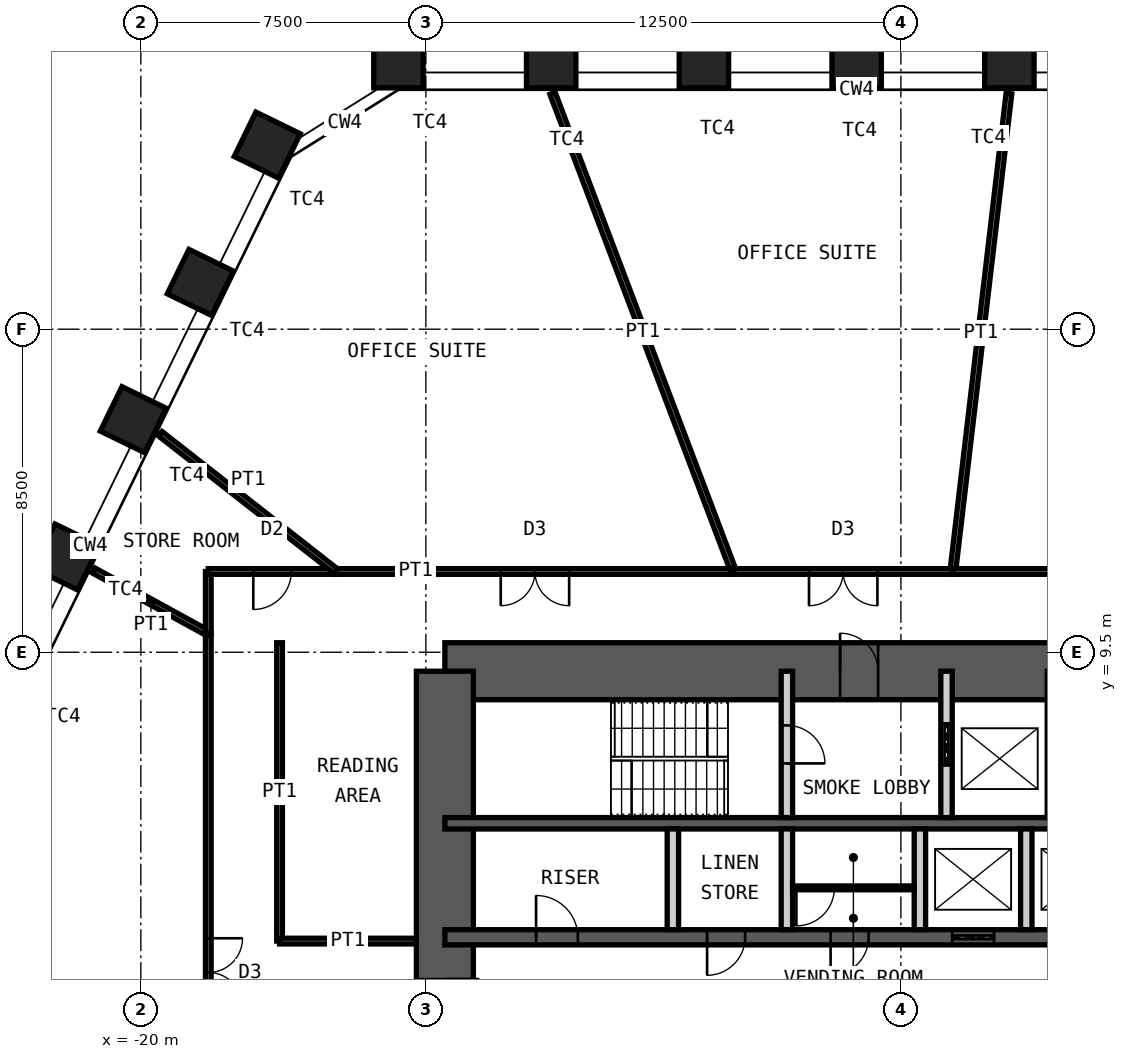
"""IFC4 building model, lengths in metres.
Left out: names, types, materials, properties, quantities, classifications, styles, units other than length and angle.
Written with IfcOpenShell. Run it as: python <this file> out.ifc"""

import sys

from ifc_helpers import new_model, si_unit, direction, frame, frame_2d, origin, origin_2d, place, context, subcontext, project, spatial, rectangle, hollow_rectangle, extrude, element, fill, save


model = new_model("IFC4")
c1 = context("Model", 3, precision=1e-05, world=origin(), true_north=direction((0.0, 1.0)))
c2 = subcontext(c1, "Body", "Model", "MODEL_VIEW")
j1 = project(units=[si_unit("LENGTHUNIT", "METRE"), si_unit("PLANEANGLEUNIT", "RADIAN")], contexts=[c1])
p1 = place(None, origin())
s1 = spatial("IfcSite", under=j1, at=p1, CompositionType="ELEMENT")
p2 = place(p1, origin())
s2 = spatial("IfcBuilding", under=s1, at=p2, CompositionType="ELEMENT")
p3 = place(p2, frame((0.0, 0.0, 166.0)))
s3 = spatial("IfcBuildingStorey", under=s2, at=p3, CompositionType="ELEMENT", Elevation=166.0)
for number, where, z_axis, x_axis in (
    (1, (-13.222, 25.0, 0.0), (0.0, 0.0, 1.0), (-1.0, 0.0, 0.0)),
    (2, (-9.203, 25.0, 0.0), (0.0, 0.0, 1.0), (-1.0, 0.0, 0.0)),
    (3, (-5.184, 25.0, 0.0), (0.0, 0.0, 1.0), (-1.0, 0.0, 0.0)),
    (4, (-1.165, 25.0, 0.0), (0.0, 0.0, 1.0), (-1.0, 0.0, 0.0)),
    (5, (2.854, 25.0, 0.0), (0.0, 0.0, 1.0), (-1.0, 0.0, 0.0)),
    (6, (-21.959, 12.006, 0.0), (0.0, 0.0, 1.0), (-0.438, -0.899, 0.0)),
    (7, (-20.198, 15.618, 0.0), (0.0, 0.0, 1.0), (-0.438, -0.899, 0.0)),
    (8, (-18.436, 19.23, 0.0), (0.0, 0.0, 1.0), (-0.438, -0.899, 0.0)),
    (9, (-16.674, 22.843, 0.0), (0.0, 0.0, 1.0), (-0.438, -0.899, 0.0)),
):
    element("IfcColumn", number, at=place(p3, frame(where, z_axis=z_axis, x_axis=x_axis)), inside=s3, PredefinedType="COLUMN", context=c2, shape_type="SweptSolid", body=[
        extrude(hollow_rectangle(XDim=1.3, YDim=1.3, WallThickness=0.1, at=origin_2d()), origin(), (0.0, 0.0, 1.0), 4.2),
    ])
p4 = place(p3, frame((-12.0, 9.0, 0.0), z_axis=(0.0, 0.0, 1.0), x_axis=(1.0, 0.0, 0.0)))
e10 = element("IfcWall", 10, at=p4, inside=s3, PredefinedType="SHEAR", context=c2, shape_type="SweptSolid", body=[
    extrude(rectangle(XDim=24.0, YDim=1.5, at=frame_2d((12.0, 0.0))), origin(), (0.0, 0.0, 1.0), 4.2),
])
p5 = place(p4, frame((10.4, 0.0, 0.0)))
e11 = element("IfcOpeningElement", 11, at=p5, cuts=e10, PredefinedType="OPENING", context=c2, shape_type="SweptSolid", body=[
    extrude(rectangle(XDim=1.0, YDim=2.1, at=frame_2d((0.5, 1.05))), frame((0.0, 0.76, 0.0), z_axis=(0.0, -1.0, 0.0), x_axis=(1.0, 0.0, 0.0)), (0.0, 0.0, 1.0), 1.52),
])
p6 = place(p4, frame((17.6, 0.0, 0.0)))
e12 = element("IfcOpeningElement", 12, at=p6, cuts=e10, PredefinedType="OPENING", context=c2, shape_type="SweptSolid", body=[
    extrude(rectangle(XDim=0.9, YDim=2.1, at=frame_2d((0.45, 1.05))), frame((0.0, 0.76, 0.0), z_axis=(0.0, -1.0, 0.0), x_axis=(1.0, 0.0, 0.0)), (0.0, 0.0, 1.0), 1.52),
])
p7 = place(p4, frame((21.9, 0.0, 0.0)))
e13 = element("IfcOpeningElement", 13, at=p7, cuts=e10, PredefinedType="OPENING", context=c2, shape_type="SweptSolid", body=[
    extrude(rectangle(XDim=0.9, YDim=2.1, at=frame_2d((0.45, 1.05))), frame((0.0, 0.76, 0.0), z_axis=(0.0, -1.0, 0.0), x_axis=(1.0, 0.0, 0.0)), (0.0, 0.0, 1.0), 1.52),
])
p8 = place(p3, frame((-12.0, -9.0, 0.0), z_axis=(0.0, 0.0, 1.0), x_axis=(0.0, 1.0, 0.0)))
e14 = element("IfcWall", 14, at=p8, inside=s3, PredefinedType="SHEAR", context=c2, shape_type="SweptSolid", body=[
    extrude(rectangle(XDim=18.0, YDim=1.5, at=frame_2d((9.0, 0.0))), origin(), (0.0, 0.0, 1.0), 4.2),
])
p9 = place(p8, frame((8.1, 0.0, 0.0)))
e15 = element("IfcOpeningElement", 15, at=p9, cuts=e14, PredefinedType="OPENING", context=c2, shape_type="SweptSolid", body=[
    extrude(rectangle(XDim=1.8, YDim=2.1, at=frame_2d((0.9, 1.05))), frame((0.0, 0.76, 0.0), z_axis=(0.0, -1.0, 0.0), x_axis=(1.0, 0.0, 0.0)), (0.0, 0.0, 1.0), 1.52),
])
p10 = place(p3, frame((-12.0, 5.0, 0.0), z_axis=(0.0, 0.0, 1.0), x_axis=(1.0, 0.0, 0.0)))
e16 = element("IfcWall", 16, at=p10, inside=s3, PredefinedType="SHEAR", context=c2, shape_type="SweptSolid", body=[
    extrude(rectangle(XDim=24.0, YDim=0.3, at=frame_2d((12.0, 0.0))), origin(), (0.0, 0.0, 1.0), 4.2),
])
p11 = place(p3, frame((-12.0, 2.0, 0.0), z_axis=(0.0, 0.0, 1.0), x_axis=(1.0, 0.0, 0.0)))
e17 = element("IfcWall", 17, at=p11, inside=s3, PredefinedType="SHEAR", context=c2, shape_type="SweptSolid", body=[
    extrude(rectangle(XDim=24.0, YDim=0.4, at=frame_2d((12.0, 0.0))), origin(), (0.0, 0.0, 1.0), 4.2),
])
p12 = place(p11, frame((2.4, 0.0, 0.0)))
e18 = element("IfcOpeningElement", 18, at=p12, cuts=e17, PredefinedType="OPENING", context=c2, shape_type="SweptSolid", body=[
    extrude(rectangle(XDim=1.1, YDim=2.1, at=frame_2d((0.55, 1.05))), frame((0.0, 0.21, 0.0), z_axis=(0.0, -1.0, 0.0), x_axis=(1.0, 0.0, 0.0)), (0.0, 0.0, 1.0), 0.42),
])
p13 = place(p11, frame((22.0, 0.0, 0.0)))
e19 = element("IfcOpeningElement", 19, at=p13, cuts=e17, PredefinedType="OPENING", context=c2, shape_type="SweptSolid", body=[
    extrude(rectangle(XDim=1.1, YDim=2.1, at=frame_2d((0.55, 1.05))), frame((0.0, 0.21, 0.0), z_axis=(0.0, -1.0, 0.0), x_axis=(1.0, 0.0, 0.0)), (0.0, 0.0, 1.0), 0.42),
])
p14 = place(p11, frame((10.15, 0.0, 0.0)))
e20 = element("IfcOpeningElement", 20, at=p14, cuts=e17, PredefinedType="OPENING", context=c2, shape_type="SweptSolid", body=[
    extrude(rectangle(XDim=1.0, YDim=2.1, at=frame_2d((0.5, 1.05))), frame((0.0, 0.21, 0.0), z_axis=(0.0, -1.0, 0.0), x_axis=(1.0, 0.0, 0.0)), (0.0, 0.0, 1.0), 0.42),
])
p15 = place(p11, frame((6.9, 0.0, 0.0)))
e21 = element("IfcOpeningElement", 21, at=p15, cuts=e17, PredefinedType="OPENING", context=c2, shape_type="SweptSolid", body=[
    extrude(rectangle(XDim=1.0, YDim=2.1, at=frame_2d((0.5, 1.05))), frame((0.0, 0.21, 0.0), z_axis=(0.0, -1.0, 0.0), x_axis=(1.0, 0.0, 0.0)), (0.0, 0.0, 1.0), 0.42),
])
p16 = place(p11, frame((13.35, 0.0, 0.0)))
e22 = element("IfcOpeningElement", 22, at=p16, cuts=e17, PredefinedType="OPENING", context=c2, shape_type="SweptSolid", body=[
    extrude(rectangle(XDim=1.1, YDim=2.4, at=frame_2d((0.55, 1.2))), frame((0.0, 0.21, 0.0), z_axis=(0.0, -1.0, 0.0), x_axis=(1.0, 0.0, 0.0)), (0.0, 0.0, 1.0), 0.42),
])
p17 = place(p11, frame((16.15, 0.0, 0.0)))
e23 = element("IfcOpeningElement", 23, at=p17, cuts=e17, PredefinedType="OPENING", context=c2, shape_type="SweptSolid", body=[
    extrude(rectangle(XDim=1.1, YDim=2.4, at=frame_2d((0.55, 1.2))), frame((0.0, 0.21, 0.0), z_axis=(0.0, -1.0, 0.0), x_axis=(1.0, 0.0, 0.0)), (0.0, 0.0, 1.0), 0.42),
])
p18 = place(p11, frame((18.95, 0.0, 0.0)))
e24 = element("IfcOpeningElement", 24, at=p18, cuts=e17, PredefinedType="OPENING", context=c2, shape_type="SweptSolid", body=[
    extrude(rectangle(XDim=1.1, YDim=2.4, at=frame_2d((0.55, 1.2))), frame((0.0, 0.21, 0.0), z_axis=(0.0, -1.0, 0.0), x_axis=(1.0, 0.0, 0.0)), (0.0, 0.0, 1.0), 0.42),
])
p19 = place(p3, frame((-3.0, 5.15, 0.0), z_axis=(0.0, 0.0, 1.0), x_axis=(0.0, 1.0, 0.0)))
e25 = element("IfcWall", 25, at=p19, inside=s3, PredefinedType="PARTITIONING", context=c2, shape_type="SweptSolid", body=[
    extrude(rectangle(XDim=3.85, YDim=0.3, at=frame_2d((1.925, 0.0))), origin(), (0.0, 0.0, 1.0), 3.98),
])
p20 = place(p19, frame((1.425, 0.0, 0.0)))
e26 = element("IfcOpeningElement", 26, at=p20, cuts=e25, PredefinedType="OPENING", context=c2, shape_type="SweptSolid", body=[
    extrude(rectangle(XDim=1.0, YDim=2.1, at=frame_2d((0.5, 1.05))), frame((0.0, 0.16, 0.0), z_axis=(0.0, -1.0, 0.0), x_axis=(1.0, 0.0, 0.0)), (0.0, 0.0, 1.0), 0.32),
])
p21 = place(p3, frame((1.2, 5.15, 0.0), z_axis=(0.0, 0.0, 1.0), x_axis=(0.0, 1.0, 0.0)))
e27 = element("IfcWall", 27, at=p21, inside=s3, PredefinedType="PARTITIONING", context=c2, shape_type="SweptSolid", body=[
    extrude(rectangle(XDim=3.85, YDim=0.3, at=frame_2d((1.925, 0.0))), origin(), (0.0, 0.0, 1.0), 3.98),
])
p22 = place(p21, frame((1.375, 0.0, 0.0)))
e28 = element("IfcOpeningElement", 28, at=p22, cuts=e27, PredefinedType="OPENING", context=c2, shape_type="SweptSolid", body=[
    extrude(rectangle(XDim=1.1, YDim=2.4, at=frame_2d((0.55, 1.2))), frame((0.0, 0.16, 0.0), z_axis=(0.0, -1.0, 0.0), x_axis=(1.0, 0.0, 0.0)), (0.0, 0.0, 1.0), 0.32),
])
p23 = place(p3, frame((4.0, 5.15, 0.0), z_axis=(0.0, 0.0, 1.0), x_axis=(0.0, 1.0, 0.0)))
e29 = element("IfcWall", 29, at=p23, inside=s3, PredefinedType="PARTITIONING", context=c2, shape_type="SweptSolid", body=[
    extrude(rectangle(XDim=3.85, YDim=0.3, at=frame_2d((1.925, 0.0))), origin(), (0.0, 0.0, 1.0), 3.98),
])
for number, where, z_axis, x_axis in (
    (30, (-6.0, 2.2, 0.0), (0.0, 0.0, 1.0), (0.0, 1.0, 0.0)),
    (31, (-3.0, 2.2, 0.0), (0.0, 0.0, 1.0), (0.0, 1.0, 0.0)),
    (32, (0.5, 2.2, 0.0), (0.0, 0.0, 1.0), (0.0, 1.0, 0.0)),
    (33, (3.3, 2.2, 0.0), (0.0, 0.0, 1.0), (0.0, 1.0, 0.0)),
):
    element("IfcWall", number, at=place(p3, frame(where, z_axis=z_axis, x_axis=x_axis)), inside=s3, PredefinedType="PARTITIONING", context=c2, shape_type="SweptSolid", body=[
        extrude(rectangle(XDim=2.65, YDim=0.3, at=frame_2d((1.325, 0.0))), origin(), (0.0, 0.0, 1.0), 3.98),
    ])
p24 = place(p3, frame((-2.85, 3.3, 0.0), z_axis=(0.0, 0.0, 1.0), x_axis=(1.0, 0.0, 0.0)))
e34 = element("IfcWall", 34, at=p24, inside=s3, PredefinedType="PARTITIONING", context=c2, shape_type="SweptSolid", body=[
    extrude(rectangle(XDim=3.2, YDim=0.1, at=frame_2d((1.6, 0.0))), origin(), (0.0, 0.0, 1.0), 3.98),
])
p25 = place(p24, frame((0.1, 0.0, 0.0)))
e35 = element("IfcOpeningElement", 35, at=p25, cuts=e34, PredefinedType="OPENING", context=c2, shape_type="SweptSolid", body=[
    extrude(rectangle(XDim=1.0, YDim=2.4, at=frame_2d((0.5, 1.2))), frame((0.0, 0.06, 0.0), z_axis=(0.0, -1.0, 0.0), x_axis=(1.0, 0.0, 0.0)), (0.0, 0.0, 1.0), 0.12),
])
p26 = place(p3, frame((2.843, 24.201, 0.0), z_axis=(0.0, 0.0, 1.0), x_axis=(-0.116670084723, -0.993170726175, 0.0)))
e36 = element("IfcWall", 36, at=p26, inside=s3, PredefinedType="PARTITIONING", context=c2, shape_type="SweptSolid", body=[
    extrude(rectangle(XDim=12.662, YDim=0.15, at=frame_2d((6.331, 0.0))), origin(), (0.0, 0.0, 1.0), 2.93),
])
p27 = place(p3, frame((1.366, 11.625, 0.0), z_axis=(0.0, 0.0, 1.0), x_axis=(1.0, 0.0, 0.0)))
e37 = element("IfcWall", 37, at=p27, inside=s3, PredefinedType="PARTITIONING", context=c2, shape_type="SweptSolid", body=[
    extrude(rectangle(XDim=8.46, YDim=0.15, at=frame_2d((4.23, 0.0))), origin(), (0.0, 0.0, 1.0), 4.03),
])
p28 = place(p27, frame((3.33, 0.0, 0.0)))
e38 = element("IfcOpeningElement", 38, at=p28, cuts=e37, PredefinedType="OPENING", context=c2, shape_type="SweptSolid", body=[
    extrude(rectangle(XDim=1.8, YDim=2.4, at=frame_2d((0.9, 1.2))), frame((0.0, 0.085, 0.0), z_axis=(0.0, -1.0, 0.0), x_axis=(1.0, 0.0, 0.0)), (0.0, 0.0, 1.0), 0.17),
])
p29 = place(p3, frame((-18.225, -7.849, 0.0), z_axis=(0.0, 0.0, 1.0), x_axis=(0.0, 1.0, 0.0)))
e39 = element("IfcWall", 39, at=p29, inside=s3, PredefinedType="PARTITIONING", context=c2, shape_type="SweptSolid", body=[
    extrude(rectangle(XDim=17.845, YDim=0.15, at=frame_2d((8.922, 0.0))), origin(), (0.0, 0.0, 1.0), 4.03),
])
p30 = place(p29, frame((8.022, 0.0, 0.0)))
e40 = element("IfcOpeningElement", 40, at=p30, cuts=e39, PredefinedType="OPENING", context=c2, shape_type="SweptSolid", body=[
    extrude(rectangle(XDim=1.8, YDim=2.4, at=frame_2d((0.9, 1.2))), frame((0.0, 0.085, 0.0), z_axis=(0.0, -1.0, 0.0), x_axis=(1.0, 0.0, 0.0)), (0.0, 0.0, 1.0), 0.17),
])
p31 = place(p3, frame((-21.242, 11.651, 0.0), z_axis=(0.0, 0.0, 1.0), x_axis=(0.876768023831, -0.480913539409, 0.0)))
e41 = element("IfcWall", 41, at=p31, inside=s3, PredefinedType="PARTITIONING", context=c2, shape_type="SweptSolid", body=[
    extrude(rectangle(XDim=3.441, YDim=0.15, at=frame_2d((1.721, 0.0))), origin(), (0.0, 0.0, 1.0), 2.93),
])
p32 = place(p3, frame((-18.225, 9.996, 0.0), z_axis=(0.0, 0.0, 1.0), x_axis=(0.0, 1.0, 0.0)))
e42 = element("IfcWall", 42, at=p32, inside=s3, PredefinedType="PARTITIONING", context=c2, shape_type="SweptSolid", body=[
    extrude(rectangle(XDim=1.629, YDim=0.15, at=frame_2d((0.814, 0.0))), origin(), (0.0, 0.0, 1.0), 4.03),
])
p33 = place(p3, frame((-18.225, 11.625, 0.0), z_axis=(0.0, 0.0, 1.0), x_axis=(1.0, 0.0, 0.0)))
e43 = element("IfcWall", 43, at=p33, inside=s3, PredefinedType="PARTITIONING", context=c2, shape_type="SweptSolid", body=[
    extrude(rectangle(XDim=3.368, YDim=0.15, at=frame_2d((1.684, 0.0))), origin(), (0.0, 0.0, 1.0), 4.03),
])
p34 = place(p33, frame((1.184, 0.0, 0.0)))
e44 = element("IfcOpeningElement", 44, at=p34, cuts=e43, PredefinedType="OPENING", context=c2, shape_type="SweptSolid", body=[
    extrude(rectangle(XDim=1.0, YDim=2.4, at=frame_2d((0.5, 1.2))), frame((0.0, 0.085, 0.0), z_axis=(0.0, -1.0, 0.0), x_axis=(1.0, 0.0, 0.0)), (0.0, 0.0, 1.0), 0.17),
])
p35 = place(p3, frame((-19.49, 15.25, 0.0), z_axis=(0.0, 0.0, 1.0), x_axis=(0.787549668605, -0.616251182133, 0.0)))
e45 = element("IfcWall", 45, at=p35, inside=s3, PredefinedType="PARTITIONING", context=c2, shape_type="SweptSolid", body=[
    extrude(rectangle(XDim=5.882, YDim=0.15, at=frame_2d((2.941, 0.0))), origin(), (0.0, 0.0, 1.0), 2.93),
])
p36 = place(p3, frame((-14.857, 11.625, 0.0), z_axis=(0.0, 0.0, 1.0), x_axis=(1.0, 0.0, 0.0)))
e46 = element("IfcWall", 46, at=p36, inside=s3, PredefinedType="PARTITIONING", context=c2, shape_type="SweptSolid", body=[
    extrude(rectangle(XDim=10.455, YDim=0.15, at=frame_2d((5.227, 0.0))), origin(), (0.0, 0.0, 1.0), 4.03),
])
p37 = place(p36, frame((4.327, 0.0, 0.0)))
e47 = element("IfcOpeningElement", 47, at=p37, cuts=e46, PredefinedType="OPENING", context=c2, shape_type="SweptSolid", body=[
    extrude(rectangle(XDim=1.8, YDim=2.4, at=frame_2d((0.9, 1.2))), frame((0.0, 0.085, 0.0), z_axis=(0.0, -1.0, 0.0), x_axis=(1.0, 0.0, 0.0)), (0.0, 0.0, 1.0), 0.17),
])
p38 = place(p3, frame((-9.167, 24.207, 0.0), z_axis=(0.0, 0.0, 1.0), x_axis=(0.354156368181, -0.935186220427, 0.0)))
e48 = element("IfcWall", 48, at=p38, inside=s3, PredefinedType="PARTITIONING", context=c2, shape_type="SweptSolid", body=[
    extrude(rectangle(XDim=13.454, YDim=0.15, at=frame_2d((6.727, 0.0))), origin(), (0.0, 0.0, 1.0), 2.93),
])
p39 = place(p3, frame((-4.403, 11.625, 0.0), z_axis=(0.0, 0.0, 1.0), x_axis=(1.0, 0.0, 0.0)))
e49 = element("IfcWall", 49, at=p39, inside=s3, PredefinedType="PARTITIONING", context=c2, shape_type="SweptSolid", body=[
    extrude(rectangle(XDim=5.768, YDim=0.15, at=frame_2d((2.884, 0.0))), origin(), (0.0, 0.0, 1.0), 4.03),
])
p40 = place(p39, frame((1.984, 0.0, 0.0)))
e50 = element("IfcOpeningElement", 50, at=p40, cuts=e49, PredefinedType="OPENING", context=c2, shape_type="SweptSolid", body=[
    extrude(rectangle(XDim=1.8, YDim=2.4, at=frame_2d((0.9, 1.2))), frame((0.0, 0.085, 0.0), z_axis=(0.0, -1.0, 0.0), x_axis=(1.0, 0.0, 0.0)), (0.0, 0.0, 1.0), 0.17),
])
p41 = place(p3, frame((-16.35, 1.9, 0.0), z_axis=(0.0, 0.0, 1.0), x_axis=(0.0, 1.0, 0.0)))
e51 = element("IfcWall", 51, at=p41, inside=s3, PredefinedType="PARTITIONING", context=c2, shape_type="SweptSolid", body=[
    extrude(rectangle(XDim=7.85, YDim=0.15, at=frame_2d((3.925, 0.0))), origin(), (0.0, 0.0, 1.0), 4.03),
])
p42 = place(p3, frame((-12.75, 1.9, 0.0), z_axis=(0.0, 0.0, 1.0), x_axis=(-1.0, 0.0, 0.0)))
e52 = element("IfcWall", 52, at=p42, inside=s3, PredefinedType="PARTITIONING", context=c2, shape_type="SweptSolid", body=[
    extrude(rectangle(XDim=3.6, YDim=0.15, at=frame_2d((1.8, 0.0))), origin(), (0.0, 0.0, 1.0), 2.93),
])
p43 = place(p5, origin())
e53 = element("IfcDoor", 53, at=p43, inside=s3, OperationType="SINGLE_SWING_RIGHT", PredefinedType="DOOR", context=c2, shape_type="SweptSolid", body=[
    extrude(rectangle(XDim=1.0, YDim=2.1, at=frame_2d((0.5, 1.05))), frame((0.0, 0.025, 0.0), z_axis=(0.0, -1.0, 0.0), x_axis=(1.0, 0.0, 0.0)), (0.0, 0.0, 1.0), 0.05),
])
fill(e11, e53)
p44 = place(p20, origin())
e54 = element("IfcDoor", 54, at=p44, inside=s3, OperationType="SINGLE_SWING_LEFT", PredefinedType="DOOR", context=c2, shape_type="SweptSolid", body=[
    extrude(rectangle(XDim=1.0, YDim=2.1, at=frame_2d((0.5, 1.05))), frame((0.0, 0.025, 0.0), z_axis=(0.0, -1.0, 0.0), x_axis=(1.0, 0.0, 0.0)), (0.0, 0.0, 1.0), 0.05),
])
fill(e26, e54)
p45 = place(p12, origin())
e55 = element("IfcDoor", 55, at=p45, inside=s3, OperationType="SINGLE_SWING_RIGHT", PredefinedType="DOOR", context=c2, shape_type="SweptSolid", body=[
    extrude(rectangle(XDim=1.1, YDim=2.1, at=frame_2d((0.55, 1.05))), frame((0.0, 0.025, 0.0), z_axis=(0.0, -1.0, 0.0), x_axis=(1.0, 0.0, 0.0)), (0.0, 0.0, 1.0), 0.05),
])
fill(e18, e55)
p46 = place(p14, origin())
e56 = element("IfcDoor", 56, at=p46, inside=s3, OperationType="SINGLE_SWING_LEFT", PredefinedType="DOOR", context=c2, shape_type="SweptSolid", body=[
    extrude(rectangle(XDim=1.0, YDim=2.1, at=frame_2d((0.5, 1.05))), frame((0.0, 0.025, 0.0), z_axis=(0.0, -1.0, 0.0), x_axis=(1.0, 0.0, 0.0)), (0.0, 0.0, 1.0), 0.05),
])
fill(e20, e56)
p47 = place(p9, origin())
e57 = element("IfcDoor", 57, at=p47, inside=s3, OperationType="DOUBLE_DOOR_DOUBLE_SWING", PredefinedType="DOOR", context=c2, shape_type="SweptSolid", body=[
    extrude(rectangle(XDim=1.8, YDim=2.1, at=frame_2d((0.9, 1.05))), frame((0.0, 0.025, 0.0), z_axis=(0.0, -1.0, 0.0), x_axis=(1.0, 0.0, 0.0)), (0.0, 0.0, 1.0), 0.05),
])
fill(e15, e57)
p48 = place(p22, origin())
e58 = element("IfcDoor", 58, at=p48, inside=s3, OperationType="DOUBLE_DOOR_SLIDING", PredefinedType="DOOR", context=c2, shape_type="SweptSolid", body=[
    extrude(rectangle(XDim=1.1, YDim=2.4, at=frame_2d((0.55, 1.2))), frame((0.0, 0.025, 0.0), z_axis=(0.0, -1.0, 0.0), x_axis=(1.0, 0.0, 0.0)), (0.0, 0.0, 1.0), 0.05),
])
fill(e28, e58)
p49 = place(p15, origin())
e59 = element("IfcDoor", 59, at=p49, inside=s3, OperationType="SINGLE_SWING_LEFT", PredefinedType="DOOR", context=c2, shape_type="SweptSolid", body=[
    extrude(rectangle(XDim=1.0, YDim=2.1, at=frame_2d((0.5, 1.05))), frame((0.0, 0.025, 0.0), z_axis=(0.0, -1.0, 0.0), x_axis=(1.0, 0.0, 0.0)), (0.0, 0.0, 1.0), 0.05),
])
fill(e21, e59)
p50 = place(p16, origin())
e60 = element("IfcDoor", 60, at=p50, inside=s3, OperationType="DOUBLE_DOOR_SLIDING", PredefinedType="DOOR", context=c2, shape_type="SweptSolid", body=[
    extrude(rectangle(XDim=1.1, YDim=2.4, at=frame_2d((0.55, 1.2))), frame((0.0, 0.025, 0.0), z_axis=(0.0, -1.0, 0.0), x_axis=(1.0, 0.0, 0.0)), (0.0, 0.0, 1.0), 0.05),
])
fill(e22, e60)
p51 = place(p25, origin())
e61 = element("IfcDoor", 61, at=p51, inside=s3, OperationType="SINGLE_SWING_LEFT", PredefinedType="DOOR", context=c2, shape_type="SweptSolid", body=[
    extrude(rectangle(XDim=1.0, YDim=2.4, at=frame_2d((0.5, 1.2))), frame((0.0, 0.025, 0.0), z_axis=(0.0, -1.0, 0.0), x_axis=(1.0, 0.0, 0.0)), (0.0, 0.0, 1.0), 0.05),
])
fill(e35, e61)
p52 = place(p30, origin())
e62 = element("IfcDoor", 62, at=p52, inside=s3, OperationType="DOUBLE_DOOR_DOUBLE_SWING", PredefinedType="DOOR", context=c2, shape_type="SweptSolid", body=[
    extrude(rectangle(XDim=1.8, YDim=2.4, at=frame_2d((0.9, 1.2))), frame((0.0, 0.025, 0.0), z_axis=(0.0, -1.0, 0.0), x_axis=(1.0, 0.0, 0.0)), (0.0, 0.0, 1.0), 0.05),
])
fill(e40, e62)
p53 = place(p34, origin())
e63 = element("IfcDoor", 63, at=p53, inside=s3, OperationType="SINGLE_SWING_LEFT", PredefinedType="DOOR", context=c2, shape_type="SweptSolid", body=[
    extrude(rectangle(XDim=1.0, YDim=2.4, at=frame_2d((0.5, 1.2))), frame((0.0, 0.025, 0.0), z_axis=(0.0, -1.0, 0.0), x_axis=(1.0, 0.0, 0.0)), (0.0, 0.0, 1.0), 0.05),
])
fill(e44, e63)
p54 = place(p37, origin())
e64 = element("IfcDoor", 64, at=p54, inside=s3, OperationType="DOUBLE_DOOR_DOUBLE_SWING", PredefinedType="DOOR", context=c2, shape_type="SweptSolid", body=[
    extrude(rectangle(XDim=1.8, YDim=2.4, at=frame_2d((0.9, 1.2))), frame((0.0, 0.025, 0.0), z_axis=(0.0, -1.0, 0.0), x_axis=(1.0, 0.0, 0.0)), (0.0, 0.0, 1.0), 0.05),
])
fill(e47, e64)
p55 = place(p40, origin())
e65 = element("IfcDoor", 65, at=p55, inside=s3, OperationType="DOUBLE_DOOR_DOUBLE_SWING", PredefinedType="DOOR", context=c2, shape_type="SweptSolid", body=[
    extrude(rectangle(XDim=1.8, YDim=2.4, at=frame_2d((0.9, 1.2))), frame((0.0, 0.025, 0.0), z_axis=(0.0, -1.0, 0.0), x_axis=(1.0, 0.0, 0.0)), (0.0, 0.0, 1.0), 0.05),
])
fill(e50, e65)
save(model, sys.argv[1])
